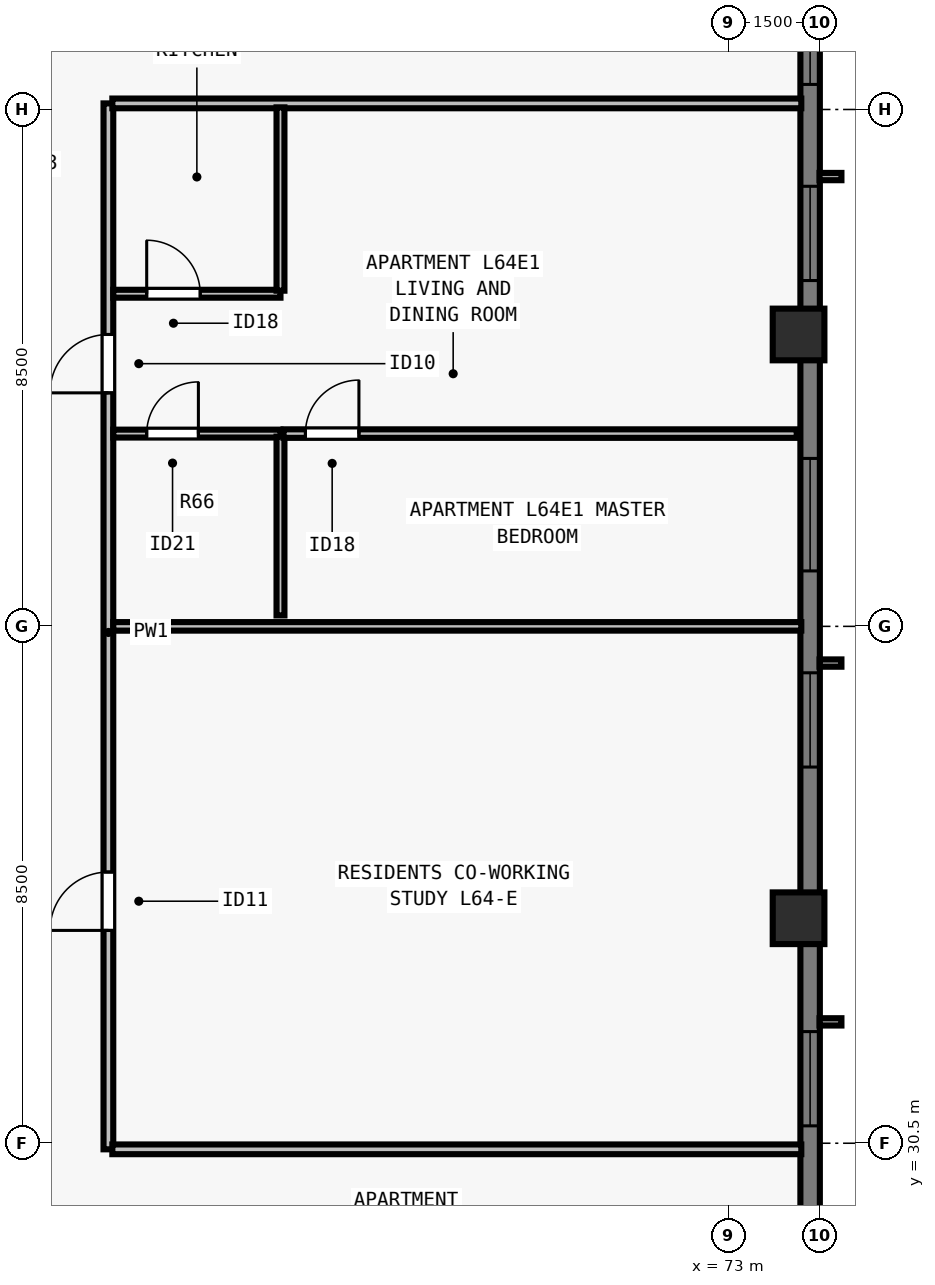
"""IFC4 building model, lengths in metres.
Left out: names, types, materials, properties, quantities, classifications, styles, units other than length and angle.
Written with IfcOpenShell. Run it as: python <this file> out.ifc"""

import sys

from ifc_helpers import new_model, si_unit, direction, frame, frame_2d, origin, origin_2d, place, context, subcontext, project, spatial, rectangle, extrude, element, fill, save


model = new_model("IFC4")
c1 = context("Model", 3, precision=1e-05, world=origin(), true_north=direction((0.0, 1.0)))
c2 = subcontext(c1, "Body", "Model", "MODEL_VIEW")
j1 = project(units=[si_unit("LENGTHUNIT", "METRE"), si_unit("PLANEANGLEUNIT", "RADIAN")], contexts=[c1])
p1 = place(None, origin())
s1 = spatial("IfcSite", under=j1, at=p1, CompositionType="ELEMENT")
p2 = place(p1, origin())
s2 = spatial("IfcBuilding", under=s1, at=p2, CompositionType="ELEMENT")
p3 = place(p2, frame((0.0, 0.0, 234.0)))
s3 = spatial("IfcBuildingStorey", under=s2, at=p3, CompositionType="ELEMENT", Elevation=234.0)
for number, where, z_axis, x_axis in (
    (1, (74.15, 34.2, 0.0), (0.0, 0.0, 1.0), (0.0, 1.0, 0.0)),
    (2, (74.15, 43.8, 0.0), (0.0, 0.0, 1.0), (0.0, 1.0, 0.0)),
):
    element("IfcColumn", number, at=place(p3, frame(where, z_axis=z_axis, x_axis=x_axis)), inside=s3, PredefinedType="COLUMN", context=c2, shape_type="SweptSolid", body=[
        extrude(rectangle(XDim=0.85, YDim=0.85, at=origin_2d()), origin(), (0.0, 0.0, 1.0), 3.5),
    ])
p4 = place(p3, frame((74.34, 56.5, 0.0), z_axis=(0.0, 0.0, 1.0), x_axis=(0.0, -1.0, 0.0)))
e3 = element("IfcWall", 3, at=p4, inside=s3, PredefinedType="SOLIDWALL", context=c2, shape_type="SweptSolid", body=[
    extrude(rectangle(XDim=34.702, YDim=0.32, at=frame_2d((17.351, 0.0))), origin(), (0.0, 0.0, 1.0), 3.29),
])
p5 = place(p4, frame((3.913, 0.0, 0.8)))
e4 = element("IfcOpeningElement", 4, at=p5, cuts=e3, PredefinedType="OPENING", context=c2, shape_type="SweptSolid", body=[
    extrude(rectangle(XDim=1.55, YDim=1.678, at=frame_2d((0.775, 0.839))), frame((0.0, 0.17, 0.0), z_axis=(0.0, -1.0, 0.0), x_axis=(1.0, 0.0, 0.0)), (0.0, 0.0, 1.0), 0.34),
])
p6 = place(p4, frame((6.738, 0.0, 0.8)))
e5 = element("IfcOpeningElement", 5, at=p6, cuts=e3, PredefinedType="OPENING", context=c2, shape_type="SweptSolid", body=[
    extrude(rectangle(XDim=1.85, YDim=1.678, at=frame_2d((0.925, 0.839))), frame((0.0, 0.17, 0.0), z_axis=(0.0, -1.0, 0.0), x_axis=(1.0, 0.0, 0.0)), (0.0, 0.0, 1.0), 0.34),
])
p7 = place(p4, frame((10.263, 0.0, 0.8)))
e6 = element("IfcOpeningElement", 6, at=p7, cuts=e3, PredefinedType="OPENING", context=c2, shape_type="SweptSolid", body=[
    extrude(rectangle(XDim=1.55, YDim=1.678, at=frame_2d((0.775, 0.839))), frame((0.0, 0.17, 0.0), z_axis=(0.0, -1.0, 0.0), x_axis=(1.0, 0.0, 0.0)), (0.0, 0.0, 1.0), 0.34),
])
p8 = place(p4, frame((14.738, 0.0, 0.8)))
e7 = element("IfcOpeningElement", 7, at=p8, cuts=e3, PredefinedType="OPENING", context=c2, shape_type="SweptSolid", body=[
    extrude(rectangle(XDim=1.85, YDim=1.678, at=frame_2d((0.925, 0.839))), frame((0.0, 0.17, 0.0), z_axis=(0.0, -1.0, 0.0), x_axis=(1.0, 0.0, 0.0)), (0.0, 0.0, 1.0), 0.34),
])
p9 = place(p4, frame((18.264, 0.0, 0.8)))
e8 = element("IfcOpeningElement", 8, at=p9, cuts=e3, PredefinedType="OPENING", context=c2, shape_type="SweptSolid", body=[
    extrude(rectangle(XDim=1.55, YDim=1.678, at=frame_2d((0.775, 0.839))), frame((0.0, 0.17, 0.0), z_axis=(0.0, -1.0, 0.0), x_axis=(1.0, 0.0, 0.0)), (0.0, 0.0, 1.0), 0.34),
])
p10 = place(p4, frame((24.164, 0.0, 0.8)))
e9 = element("IfcOpeningElement", 9, at=p10, cuts=e3, PredefinedType="OPENING", context=c2, shape_type="SweptSolid", body=[
    extrude(rectangle(XDim=1.55, YDim=1.678, at=frame_2d((0.775, 0.839))), frame((0.0, 0.17, 0.0), z_axis=(0.0, -1.0, 0.0), x_axis=(1.0, 0.0, 0.0)), (0.0, 0.0, 1.0), 0.34),
])
p11 = place(p3, frame((62.8, 30.4, 0.0), z_axis=(0.0, 0.0, 1.0), x_axis=(0.0, 1.0, 0.0)))
e10 = element("IfcWall", 10, at=p11, inside=s3, PredefinedType="PARTITIONING", context=c2, shape_type="SweptSolid", body=[
    extrude(rectangle(XDim=17.2, YDim=0.16, at=frame_2d((8.6, 0.0))), origin(), (0.0, 0.0, 1.0), 3.29),
])
p12 = place(p11, frame((3.6, 0.0, 0.0)))
e11 = element("IfcOpeningElement", 11, at=p12, cuts=e10, PredefinedType="OPENING", context=c2, shape_type="SweptSolid", body=[
    extrude(rectangle(XDim=0.96, YDim=2.12, at=frame_2d((0.48, 1.06))), frame((0.0, 0.09, 0.0), z_axis=(0.0, -1.0, 0.0), x_axis=(1.0, 0.0, 0.0)), (0.0, 0.0, 1.0), 0.18),
])
p13 = place(p11, frame((12.44, 0.0, 0.0)))
e12 = element("IfcOpeningElement", 12, at=p13, cuts=e10, PredefinedType="OPENING", context=c2, shape_type="SweptSolid", body=[
    extrude(rectangle(XDim=0.96, YDim=2.18, at=frame_2d((0.48, 1.09))), frame((0.0, 0.09, 0.0), z_axis=(0.0, -1.0, 0.0), x_axis=(1.0, 0.0, 0.0)), (0.0, 0.0, 1.0), 0.18),
])
for number, where, z_axis, x_axis in (
    (13, (62.865, 30.4, 0.0), (0.0, 0.0, 1.0), (1.0, 0.0, 0.0)),
    (14, (62.865, 47.6, 0.0), (0.0, 0.0, 1.0), (1.0, 0.0, 0.0)),
):
    element("IfcWall", number, at=place(p3, frame(where, z_axis=z_axis, x_axis=x_axis)), inside=s3, PredefinedType="PARTITIONING", context=c2, shape_type="SweptSolid", body=[
        extrude(rectangle(XDim=11.33, YDim=0.16, at=frame_2d((5.665, 0.0))), origin(), (0.0, 0.0, 1.0), 3.29),
    ])
p14 = place(p3, frame((62.88, 39.0, 0.0), z_axis=(0.0, 0.0, 1.0), x_axis=(1.0, 0.0, 0.0)))
e15 = element("IfcWall", 15, at=p14, inside=s3, PredefinedType="PARTITIONING", context=c2, shape_type="SweptSolid", body=[
    extrude(rectangle(XDim=11.315, YDim=0.14, at=frame_2d((5.658, 0.0))), origin(), (0.0, 0.0, 1.0), 3.29),
])
p15 = place(p3, frame((62.88, 42.17, 0.0), z_axis=(0.0, 0.0, 1.0), x_axis=(1.0, 0.0, 0.0)))
e16 = element("IfcWall", 16, at=p15, inside=s3, PredefinedType="PLUMBINGWALL", context=c2, shape_type="SweptSolid", body=[
    extrude(rectangle(XDim=2.75, YDim=0.13, at=frame_2d((1.375, 0.0))), origin(), (0.0, 0.0, 1.0), 3.29),
])
p16 = place(p15, frame((0.55, 0.0, 0.0)))
e17 = element("IfcOpeningElement", 17, at=p16, cuts=e16, PredefinedType="OPENING", context=c2, shape_type="SweptSolid", body=[
    extrude(rectangle(XDim=0.85, YDim=2.08, at=frame_2d((0.425, 1.04))), frame((0.0, 0.075, 0.0), z_axis=(0.0, -1.0, 0.0), x_axis=(1.0, 0.0, 0.0)), (0.0, 0.0, 1.0), 0.15),
])
p17 = place(p3, frame((65.63, 39.18, 0.0), z_axis=(0.0, 0.0, 1.0), x_axis=(0.0, 1.0, 0.0)))
e18 = element("IfcWall", 18, at=p17, inside=s3, PredefinedType="PLUMBINGWALL", context=c2, shape_type="SweptSolid", body=[
    extrude(rectangle(XDim=2.94, YDim=0.13, at=frame_2d((1.47, 0.0))), origin(), (0.0, 0.0, 1.0), 3.29),
])
p18 = place(p3, frame((62.88, 44.47, 0.0), z_axis=(0.0, 0.0, 1.0), x_axis=(1.0, 0.0, 0.0)))
e19 = element("IfcWall", 19, at=p18, inside=s3, PredefinedType="PLUMBINGWALL", context=c2, shape_type="SweptSolid", body=[
    extrude(rectangle(XDim=2.75, YDim=0.13, at=frame_2d((1.375, 0.0))), origin(), (0.0, 0.0, 1.0), 3.29),
])
p19 = place(p18, frame((0.55, 0.0, 0.0)))
e20 = element("IfcOpeningElement", 20, at=p19, cuts=e19, PredefinedType="OPENING", context=c2, shape_type="SweptSolid", body=[
    extrude(rectangle(XDim=0.88, YDim=2.1, at=frame_2d((0.44, 1.05))), frame((0.0, 0.075, 0.0), z_axis=(0.0, -1.0, 0.0), x_axis=(1.0, 0.0, 0.0)), (0.0, 0.0, 1.0), 0.15),
])
p20 = place(p3, frame((65.63, 44.52, 0.0), z_axis=(0.0, 0.0, 1.0), x_axis=(0.0, 1.0, 0.0)))
e21 = element("IfcWall", 21, at=p20, inside=s3, PredefinedType="PLUMBINGWALL", context=c2, shape_type="SweptSolid", body=[
    extrude(rectangle(XDim=3.015, YDim=0.13, at=frame_2d((1.507, 0.0))), origin(), (0.0, 0.0, 1.0), 3.29),
])
p21 = place(p3, frame((65.68, 42.17, 0.0), z_axis=(0.0, 0.0, 1.0), x_axis=(1.0, 0.0, 0.0)))
e22 = element("IfcWall", 22, at=p21, inside=s3, PredefinedType="PARTITIONING", context=c2, shape_type="SweptSolid", body=[
    extrude(rectangle(XDim=8.44, YDim=0.14, at=frame_2d((4.22, 0.0))), origin(), (0.0, 0.0, 1.0), 3.29),
])
p22 = place(p21, frame((0.36, 0.0, 0.0)))
e23 = element("IfcOpeningElement", 23, at=p22, cuts=e22, PredefinedType="OPENING", context=c2, shape_type="SweptSolid", body=[
    extrude(rectangle(XDim=0.88, YDim=2.1, at=frame_2d((0.44, 1.05))), frame((0.0, 0.08, 0.0), z_axis=(0.0, -1.0, 0.0), x_axis=(1.0, 0.0, 0.0)), (0.0, 0.0, 1.0), 0.16),
])
p23 = place(p6, origin())
e24 = element("IfcWindow", 24, at=p23, inside=s3, PartitioningType="SINGLE_PANEL", PredefinedType="WINDOW", context=c2, shape_type="SweptSolid", body=[
    extrude(rectangle(XDim=1.85, YDim=1.678, at=frame_2d((0.925, 0.839))), frame((0.0, -0.05, 0.0), z_axis=(0.0, -1.0, 0.0), x_axis=(1.0, 0.0, 0.0)), (0.0, 0.0, 1.0), 0.06),
])
fill(e5, e24)
p24 = place(p7, origin())
e25 = element("IfcWindow", 25, at=p24, inside=s3, PartitioningType="SINGLE_PANEL", PredefinedType="WINDOW", context=c2, shape_type="SweptSolid", body=[
    extrude(rectangle(XDim=1.55, YDim=1.678, at=frame_2d((0.775, 0.839))), frame((0.0, -0.05, 0.0), z_axis=(0.0, -1.0, 0.0), x_axis=(1.0, 0.0, 0.0)), (0.0, 0.0, 1.0), 0.06),
])
fill(e6, e25)
p25 = place(p8, origin())
e26 = element("IfcWindow", 26, at=p25, inside=s3, PartitioningType="SINGLE_PANEL", PredefinedType="WINDOW", context=c2, shape_type="SweptSolid", body=[
    extrude(rectangle(XDim=1.85, YDim=1.678, at=frame_2d((0.925, 0.839))), frame((0.0, -0.05, 0.0), z_axis=(0.0, -1.0, 0.0), x_axis=(1.0, 0.0, 0.0)), (0.0, 0.0, 1.0), 0.06),
])
fill(e7, e26)
p26 = place(p9, origin())
e27 = element("IfcWindow", 27, at=p26, inside=s3, PartitioningType="SINGLE_PANEL", PredefinedType="WINDOW", context=c2, shape_type="SweptSolid", body=[
    extrude(rectangle(XDim=1.55, YDim=1.678, at=frame_2d((0.775, 0.839))), frame((0.0, -0.05, 0.0), z_axis=(0.0, -1.0, 0.0), x_axis=(1.0, 0.0, 0.0)), (0.0, 0.0, 1.0), 0.06),
])
fill(e8, e27)
p27 = place(p10, origin())
e28 = element("IfcWindow", 28, at=p27, inside=s3, PartitioningType="SINGLE_PANEL", PredefinedType="WINDOW", context=c2, shape_type="SweptSolid", body=[
    extrude(rectangle(XDim=1.55, YDim=1.678, at=frame_2d((0.775, 0.839))), frame((0.0, -0.05, 0.0), z_axis=(0.0, -1.0, 0.0), x_axis=(1.0, 0.0, 0.0)), (0.0, 0.0, 1.0), 0.06),
])
fill(e9, e28)
p28 = place(p12, origin())
e29 = element("IfcDoor", 29, at=p28, inside=s3, OperationType="SINGLE_SWING_LEFT", PredefinedType="DOOR", context=c2, shape_type="SweptSolid", body=[
    extrude(rectangle(XDim=0.96, YDim=2.12, at=frame_2d((0.48, 1.06))), frame((0.0, 0.025, 0.0), z_axis=(0.0, -1.0, 0.0), x_axis=(1.0, 0.0, 0.0)), (0.0, 0.0, 1.0), 0.05),
])
fill(e11, e29)
p29 = place(p16, origin())
e30 = element("IfcDoor", 30, at=p29, inside=s3, OperationType="SINGLE_SWING_RIGHT", PredefinedType="DOOR", context=c2, shape_type="SweptSolid", body=[
    extrude(rectangle(XDim=0.85, YDim=2.08, at=frame_2d((0.425, 1.04))), frame((0.0, 0.025, 0.0), z_axis=(0.0, -1.0, 0.0), x_axis=(1.0, 0.0, 0.0)), (0.0, 0.0, 1.0), 0.05),
])
fill(e17, e30)
p30 = place(p19, origin())
e31 = element("IfcDoor", 31, at=p30, inside=s3, OperationType="SINGLE_SWING_LEFT", PredefinedType="DOOR", context=c2, shape_type="SweptSolid", body=[
    extrude(rectangle(XDim=0.88, YDim=2.1, at=frame_2d((0.44, 1.05))), frame((0.0, 0.025, 0.0), z_axis=(0.0, -1.0, 0.0), x_axis=(1.0, 0.0, 0.0)), (0.0, 0.0, 1.0), 0.05),
])
fill(e20, e31)
p31 = place(p22, origin())
e32 = element("IfcDoor", 32, at=p31, inside=s3, OperationType="SINGLE_SWING_RIGHT", PredefinedType="DOOR", context=c2, shape_type="SweptSolid", body=[
    extrude(rectangle(XDim=0.88, YDim=2.1, at=frame_2d((0.44, 1.05))), frame((0.0, 0.025, 0.0), z_axis=(0.0, -1.0, 0.0), x_axis=(1.0, 0.0, 0.0)), (0.0, 0.0, 1.0), 0.05),
])
fill(e23, e32)
p32 = place(p13, origin())
e33 = element("IfcDoor", 33, at=p32, inside=s3, OperationType="SINGLE_SWING_LEFT", PredefinedType="DOOR", context=c2, shape_type="SweptSolid", body=[
    extrude(rectangle(XDim=0.96, YDim=2.18, at=frame_2d((0.48, 1.09))), frame((0.0, 0.025, 0.0), z_axis=(0.0, -1.0, 0.0), x_axis=(1.0, 0.0, 0.0)), (0.0, 0.0, 1.0), 0.05),
])
fill(e12, e33)
save(model, sys.argv[1])
